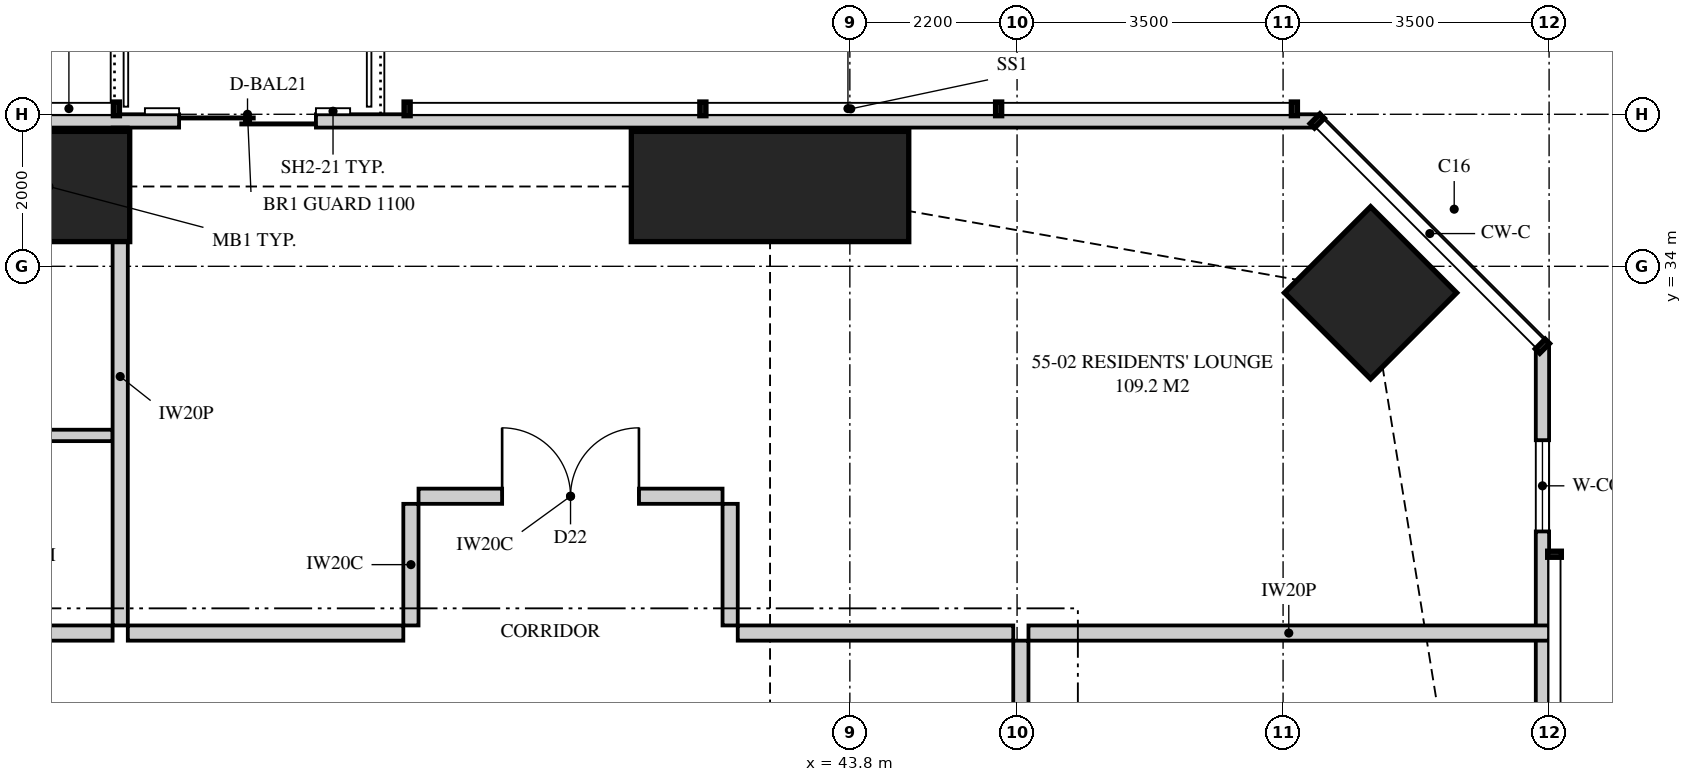
"""IFC4 building model, lengths in metres.
Left out: names, types, materials, properties, quantities, classifications, styles, units other than length and angle.
Written with IfcOpenShell. Run it as: python <this file> out.ifc"""

import sys

from ifc_helpers import new_model, si_unit, direction, frame, frame_2d, origin, origin_2d, place, context, subcontext, project, spatial, polyline, rectangle, outline, extrude, element, fill, save


model = new_model("IFC4")
c1 = context("Model", 3, precision=1e-05, world=origin(), true_north=direction((0.0, 1.0)))
c2 = subcontext(c1, "Body", "Model", "MODEL_VIEW")
j1 = project(units=[si_unit("LENGTHUNIT", "METRE"), si_unit("PLANEANGLEUNIT", "RADIAN")], contexts=[c1])
p1 = place(None, origin())
s1 = spatial("IfcSite", under=j1, at=p1, CompositionType="ELEMENT")
p2 = place(p1, origin())
s2 = spatial("IfcBuilding", under=s1, at=p2, CompositionType="ELEMENT")
p3 = place(p2, frame((0.0, 0.0, 201.25)))
s3 = spatial("IfcBuildingStorey", under=s2, at=p3, CompositionType="ELEMENT", Elevation=201.25)
p4 = place(p3, frame((50.652, 33.652, 0.0), z_axis=(0.0, 0.0, 1.0), x_axis=(0.707106781187, 0.707106781187, 0.0)))
e1 = element("IfcColumn", 1, at=p4, inside=s3, PredefinedType="COLUMN", context=c2, shape_type="SweptSolid", body=[
    extrude(rectangle(XDim=1.6, YDim=1.6, at=origin_2d()), origin(), (0.0, 0.0, 1.0), 3.35),
])
for number, where, z_axis, x_axis in (
    (2, (42.75, 35.05, 0.0), (0.0, 0.0, 1.0), (0.0, 1.0, 0.0)),
    (3, (32.5, 35.05, 0.0), (0.0, 0.0, 1.0), (0.0, 1.0, 0.0)),
):
    element("IfcColumn", number, at=place(p3, frame(where, z_axis=z_axis, x_axis=x_axis)), inside=s3, PredefinedType="COLUMN", context=c2, shape_type="SweptSolid", body=[
        extrude(rectangle(XDim=1.45, YDim=3.65, at=origin_2d()), origin(), (0.0, 0.0, 1.0), 3.35),
    ])
p5 = place(p3, frame((52.913, 3.051, 0.0), z_axis=(0.0, 0.0, 1.0), x_axis=(0.0, 1.0, 0.0)))
e4 = element("IfcWall", 4, at=p5, inside=s3, PredefinedType="SOLIDWALL", context=c2, shape_type="SweptSolid", body=[
    extrude(outline(polyline([(0.0, 0.0), (29.897, 0.0), (29.897, 3.11), (22.167, 3.11), (22.167, 2.15), (22.074, 2.15), (22.074, 3.11), (21.949, 3.11), (21.949, 2.15), (9.949, 2.15), (9.949, 3.11), (9.847, 3.11), (9.847, 2.15), (9.706, 2.15), (9.706, 3.11), (0.0, 3.11), (0.0, 0.0)])), frame((0.0, 0.087, 0.0), z_axis=(0.0, -1.0, 0.0), x_axis=(1.0, 0.0, 0.0)), (0.0, 0.0, 1.0), 0.175),
])
p6 = place(p5, frame((1.137, 0.0, 0.4)))
e5 = element("IfcOpeningElement", 5, at=p6, cuts=e4, PredefinedType="OPENING", context=c2, shape_type="SweptSolid", body=[
    extrude(rectangle(XDim=2.4, YDim=1.7, at=frame_2d((1.2, 0.85))), frame((0.0, 0.097, 0.0), z_axis=(0.0, -1.0, 0.0), x_axis=(1.0, 0.0, 0.0)), (0.0, 0.0, 1.0), 0.195),
])
p7 = place(p5, frame((5.571, 0.0, 0.4)))
e6 = element("IfcOpeningElement", 6, at=p7, cuts=e4, PredefinedType="OPENING", context=c2, shape_type="SweptSolid", body=[
    extrude(rectangle(XDim=2.4, YDim=1.7, at=frame_2d((1.2, 0.85))), frame((0.0, 0.097, 0.0), z_axis=(0.0, -1.0, 0.0), x_axis=(1.0, 0.0, 0.0)), (0.0, 0.0, 1.0), 0.195),
])
p8 = place(p5, frame((11.879, 0.0, 0.4)))
e7 = element("IfcOpeningElement", 7, at=p8, cuts=e4, PredefinedType="OPENING", context=c2, shape_type="SweptSolid", body=[
    extrude(rectangle(XDim=1.8, YDim=1.7, at=frame_2d((0.9, 0.85))), frame((0.0, 0.097, 0.0), z_axis=(0.0, -1.0, 0.0), x_axis=(1.0, 0.0, 0.0)), (0.0, 0.0, 1.0), 0.195),
])
p9 = place(p5, frame((15.324, 0.0, 0.0)))
e8 = element("IfcOpeningElement", 8, at=p9, cuts=e4, PredefinedType="OPENING", context=c2, shape_type="SweptSolid", body=[
    extrude(rectangle(XDim=1.8, YDim=2.1, at=frame_2d((0.9, 1.05))), frame((0.0, 0.097, 0.0), z_axis=(0.0, -1.0, 0.0), x_axis=(1.0, 0.0, 0.0)), (0.0, 0.0, 1.0), 0.195),
])
p10 = place(p5, frame((18.224, 0.0, 0.4)))
e9 = element("IfcOpeningElement", 9, at=p10, cuts=e4, PredefinedType="OPENING", context=c2, shape_type="SweptSolid", body=[
    extrude(rectangle(XDim=1.8, YDim=1.7, at=frame_2d((0.9, 0.85))), frame((0.0, 0.097, 0.0), z_axis=(0.0, -1.0, 0.0), x_axis=(1.0, 0.0, 0.0)), (0.0, 0.0, 1.0), 0.195),
])
p11 = place(p5, frame((27.461, 0.0, 0.4)))
e10 = element("IfcOpeningElement", 10, at=p11, cuts=e4, PredefinedType="OPENING", context=c2, shape_type="SweptSolid", body=[
    extrude(rectangle(XDim=1.2, YDim=1.7, at=frame_2d((0.6, 0.85))), frame((0.0, 0.097, 0.0), z_axis=(0.0, -1.0, 0.0), x_axis=(1.0, 0.0, 0.0)), (0.0, 0.0, 1.0), 0.195),
])
p12 = place(p3, frame((49.949, 35.913, 0.0), z_axis=(0.0, 0.0, 1.0), x_axis=(-1.0, 0.0, 0.0)))
e11 = element("IfcWall", 11, at=p12, inside=s3, PredefinedType="SOLIDWALL", context=c2, shape_type="SweptSolid", body=[
    extrude(outline(polyline([(0.0, 0.0), (34.897, 0.0), (34.897, 3.11), (27.91, 3.11), (27.91, 2.15), (27.836, 2.15), (27.836, 3.11), (27.699, 3.11), (27.699, 2.15), (7.199, 2.15), (7.199, 3.11), (7.062, 3.11), (7.062, 2.15), (6.987, 2.15), (6.987, 3.11), (0.0, 3.11), (0.0, 0.0)])), frame((0.0, 0.087, 0.0), z_axis=(0.0, -1.0, 0.0), x_axis=(1.0, 0.0, 0.0)), (0.0, 0.0, 1.0), 0.175),
])
p13 = place(p12, frame((13.174, 0.0, 0.0)))
e12 = element("IfcOpeningElement", 12, at=p13, cuts=e11, PredefinedType="OPENING", context=c2, shape_type="SweptSolid", body=[
    extrude(rectangle(XDim=1.8, YDim=2.1, at=frame_2d((0.9, 1.05))), frame((0.0, 0.097, 0.0), z_axis=(0.0, -1.0, 0.0), x_axis=(1.0, 0.0, 0.0)), (0.0, 0.0, 1.0), 0.195),
])
p14 = place(p12, frame((19.374, 0.0, 0.4)))
e13 = element("IfcOpeningElement", 13, at=p14, cuts=e11, PredefinedType="OPENING", context=c2, shape_type="SweptSolid", body=[
    extrude(rectangle(XDim=1.8, YDim=1.7, at=frame_2d((0.9, 0.85))), frame((0.0, 0.097, 0.0), z_axis=(0.0, -1.0, 0.0), x_axis=(1.0, 0.0, 0.0)), (0.0, 0.0, 1.0), 0.195),
])
p15 = place(p12, frame((23.224, 0.0, 0.4)))
e14 = element("IfcOpeningElement", 14, at=p15, cuts=e11, PredefinedType="OPENING", context=c2, shape_type="SweptSolid", body=[
    extrude(rectangle(XDim=2.4, YDim=1.7, at=frame_2d((1.2, 0.85))), frame((0.0, 0.097, 0.0), z_axis=(0.0, -1.0, 0.0), x_axis=(1.0, 0.0, 0.0)), (0.0, 0.0, 1.0), 0.195),
])
p16 = place(p12, frame((32.399, 0.0, 0.4)))
e15 = element("IfcOpeningElement", 15, at=p16, cuts=e11, PredefinedType="OPENING", context=c2, shape_type="SweptSolid", body=[
    extrude(rectangle(XDim=1.8, YDim=1.7, at=frame_2d((0.9, 0.85))), frame((0.0, 0.097, 0.0), z_axis=(0.0, -1.0, 0.0), x_axis=(1.0, 0.0, 0.0)), (0.0, 0.0, 1.0), 0.195),
])
p17 = place(p3, frame((34.2, 35.825, 0.0), z_axis=(0.0, 0.0, 1.0), x_axis=(0.0, -1.0, 0.0)))
e16 = element("IfcWall", 16, at=p17, inside=s3, PredefinedType="PARTITIONING", context=c2, shape_type="SweptSolid", body=[
    extrude(outline(polyline([(0.0, 0.0), (6.55, 0.0), (6.55, 3.11), (1.685, 3.11), (1.685, 2.15), (0.0, 2.15), (0.0, 3.11), (0.0, 0.0)])), frame((0.0, 0.1, 0.0), z_axis=(0.0, -1.0, 0.0), x_axis=(1.0, 0.0, 0.0)), (0.0, 0.0, 1.0), 0.2),
])
p18 = place(p3, frame((28.4, 31.775, 0.0), z_axis=(0.0, 0.0, 1.0), x_axis=(1.0, 0.0, 0.0)))
e17 = element("IfcWall", 17, at=p18, inside=s3, PredefinedType="PLUMBINGWALL", context=c2, shape_type="SweptSolid", body=[
    extrude(outline(polyline([(0.0, 0.0), (5.7, 0.0), (5.7, 3.11), (4.412, 3.11), (4.412, 2.541), (3.788, 2.541), (3.788, 3.11), (0.0, 3.11), (0.0, 0.0)])), frame((0.0, 0.075, 0.0), z_axis=(0.0, -1.0, 0.0), x_axis=(1.0, 0.0, 0.0)), (0.0, 0.0, 1.0), 0.15),
])
p19 = place(p18, frame((0.4, 0.0, 0.0)))
e18 = element("IfcOpeningElement", 18, at=p19, cuts=e17, PredefinedType="OPENING", context=c2, shape_type="SweptSolid", body=[
    extrude(rectangle(XDim=0.9, YDim=2.1, at=frame_2d((0.45, 1.05))), frame((0.0, 0.085, 0.0), z_axis=(0.0, -1.0, 0.0), x_axis=(1.0, 0.0, 0.0)), (0.0, 0.0, 1.0), 0.17),
])
p20 = place(p3, frame((34.3, 29.175, 0.0), z_axis=(0.0, 0.0, 1.0), x_axis=(1.0, 0.0, 0.0)))
e19 = element("IfcWall", 19, at=p20, inside=s3, PredefinedType="PARTITIONING", context=c2, shape_type="SweptSolid", body=[
    extrude(rectangle(XDim=3.625, YDim=0.2, at=frame_2d((1.812, 0.0))), origin(), (0.0, 0.0, 1.0), 3.11),
])
p21 = place(p3, frame((46.15, 29.175, 0.0), z_axis=(0.0, 0.0, 1.0), x_axis=(1.0, 0.0, 0.0)))
e20 = element("IfcWall", 20, at=p21, inside=s3, PredefinedType="PARTITIONING", context=c2, shape_type="SweptSolid", body=[
    extrude(outline(polyline([(0.0, 0.0), (6.85, 0.0), (6.85, 3.11), (6.147, 3.11), (6.147, 2.15), (4.303, 2.15), (4.303, 3.11), (0.0, 3.11), (0.0, 0.0)])), frame((0.0, 0.1, 0.0), z_axis=(0.0, -1.0, 0.0), x_axis=(1.0, 0.0, 0.0)), (0.0, 0.0, 1.0), 0.2),
])
p22 = place(p3, frame((24.5, 29.175, 0.0), z_axis=(0.0, 0.0, 1.0), x_axis=(1.0, 0.0, 0.0)))
e21 = element("IfcWall", 21, at=p22, inside=s3, PredefinedType="PARTITIONING", context=c2, shape_type="SweptSolid", body=[
    extrude(outline(polyline([(0.0, 0.0), (9.6, 0.0), (9.6, 3.11), (8.337, 3.11), (8.337, 2.541), (7.663, 2.541), (7.663, 3.11), (0.0, 3.11), (0.0, 0.0)])), frame((0.0, 0.1, 0.0), z_axis=(0.0, -1.0, 0.0), x_axis=(1.0, 0.0, 0.0)), (0.0, 0.0, 1.0), 0.2),
])
p23 = place(p3, frame((46.05, 23.7, 0.0), z_axis=(0.0, 0.0, 1.0), x_axis=(0.0, 1.0, 0.0)))
e22 = element("IfcWall", 22, at=p23, inside=s3, PredefinedType="PARTITIONING", context=c2, shape_type="SweptSolid", body=[
    extrude(outline(polyline([(0.0, 0.0), (5.375, 0.0), (5.375, 3.11), (1.637, 3.11), (1.637, 2.541), (0.963, 2.541), (0.963, 3.11), (0.0, 3.11), (0.0, 0.0)])), frame((0.0, 0.1, 0.0), z_axis=(0.0, -1.0, 0.0), x_axis=(1.0, 0.0, 0.0)), (0.0, 0.0, 1.0), 0.2),
])
p24 = place(p3, frame((42.325, 29.175, 0.0), z_axis=(0.0, 0.0, 1.0), x_axis=(1.0, 0.0, 0.0)))
e23 = element("IfcWall", 23, at=p24, inside=s3, PredefinedType="PARTITIONING", context=c2, shape_type="SweptSolid", body=[
    extrude(outline(polyline([(0.0, 0.0), (3.625, 0.0), (3.625, 3.11), (0.762, 3.11), (0.762, 2.541), (0.088, 2.541), (0.088, 3.11), (0.0, 3.11), (0.0, 0.0)])), frame((0.0, 0.1, 0.0), z_axis=(0.0, -1.0, 0.0), x_axis=(1.0, 0.0, 0.0)), (0.0, 0.0, 1.0), 0.2),
])
p25 = place(p3, frame((38.125, 30.975, 0.0), z_axis=(0.0, 0.0, 1.0), x_axis=(1.0, 0.0, 0.0)))
e24 = element("IfcWall", 24, at=p25, inside=s3, PredefinedType="PARTITIONING", context=c2, shape_type="SweptSolid", body=[
    extrude(rectangle(XDim=4.0, YDim=0.2, at=frame_2d((2.0, 0.0))), origin(), (0.0, 0.0, 1.0), 3.11),
])
p26 = place(p25, frame((1.1, 0.0, 0.0)))
e25 = element("IfcOpeningElement", 25, at=p26, cuts=e24, PredefinedType="OPENING", context=c2, shape_type="SweptSolid", body=[
    extrude(rectangle(XDim=1.8, YDim=2.1, at=frame_2d((0.9, 1.05))), frame((0.0, 0.11, 0.0), z_axis=(0.0, -1.0, 0.0), x_axis=(1.0, 0.0, 0.0)), (0.0, 0.0, 1.0), 0.22),
])
for number, where, z_axis, x_axis in (
    (26, (38.025, 29.275, 0.0), (0.0, 0.0, 1.0), (0.0, 1.0, 0.0)),
    (27, (42.225, 29.275, 0.0), (0.0, 0.0, 1.0), (0.0, 1.0, 0.0)),
):
    element("IfcWall", number, at=place(p3, frame(where, z_axis=z_axis, x_axis=x_axis)), inside=s3, PredefinedType="PARTITIONING", context=c2, shape_type="SweptSolid", body=[
        extrude(rectangle(XDim=1.6, YDim=0.2, at=frame_2d((0.8, 0.0))), origin(), (0.0, 0.0, 1.0), 3.11),
    ])
p27 = place(p11, origin())
e28 = element("IfcWindow", 28, at=p27, inside=s3, PartitioningType="SINGLE_PANEL", PredefinedType="WINDOW", context=c2, shape_type="SweptSolid", body=[
    extrude(rectangle(XDim=1.2, YDim=1.7, at=frame_2d((0.6, 0.85))), frame((0.0, 0.03, 0.0), z_axis=(0.0, -1.0, 0.0), x_axis=(1.0, 0.0, 0.0)), (0.0, 0.0, 1.0), 0.06),
])
fill(e10, e28)
p28 = place(p13, origin())
e29 = element("IfcDoor", 29, at=p28, inside=s3, OperationType="SLIDING_TO_LEFT", PredefinedType="DOOR", context=c2, shape_type="SweptSolid", body=[
    extrude(rectangle(XDim=1.8, YDim=2.1, at=frame_2d((0.9, 1.05))), frame((0.0, 0.025, 0.0), z_axis=(0.0, -1.0, 0.0), x_axis=(1.0, 0.0, 0.0)), (0.0, 0.0, 1.0), 0.05),
])
fill(e12, e29)
p29 = place(p26, origin())
e30 = element("IfcDoor", 30, at=p29, inside=s3, OperationType="DOUBLE_DOOR_SINGLE_SWING", PredefinedType="DOOR", context=c2, shape_type="SweptSolid", body=[
    extrude(rectangle(XDim=1.8, YDim=2.1, at=frame_2d((0.9, 1.05))), frame((0.0, 0.025, 0.0), z_axis=(0.0, -1.0, 0.0), x_axis=(1.0, 0.0, 0.0)), (0.0, 0.0, 1.0), 0.05),
])
fill(e25, e30)
save(model, sys.argv[1])
